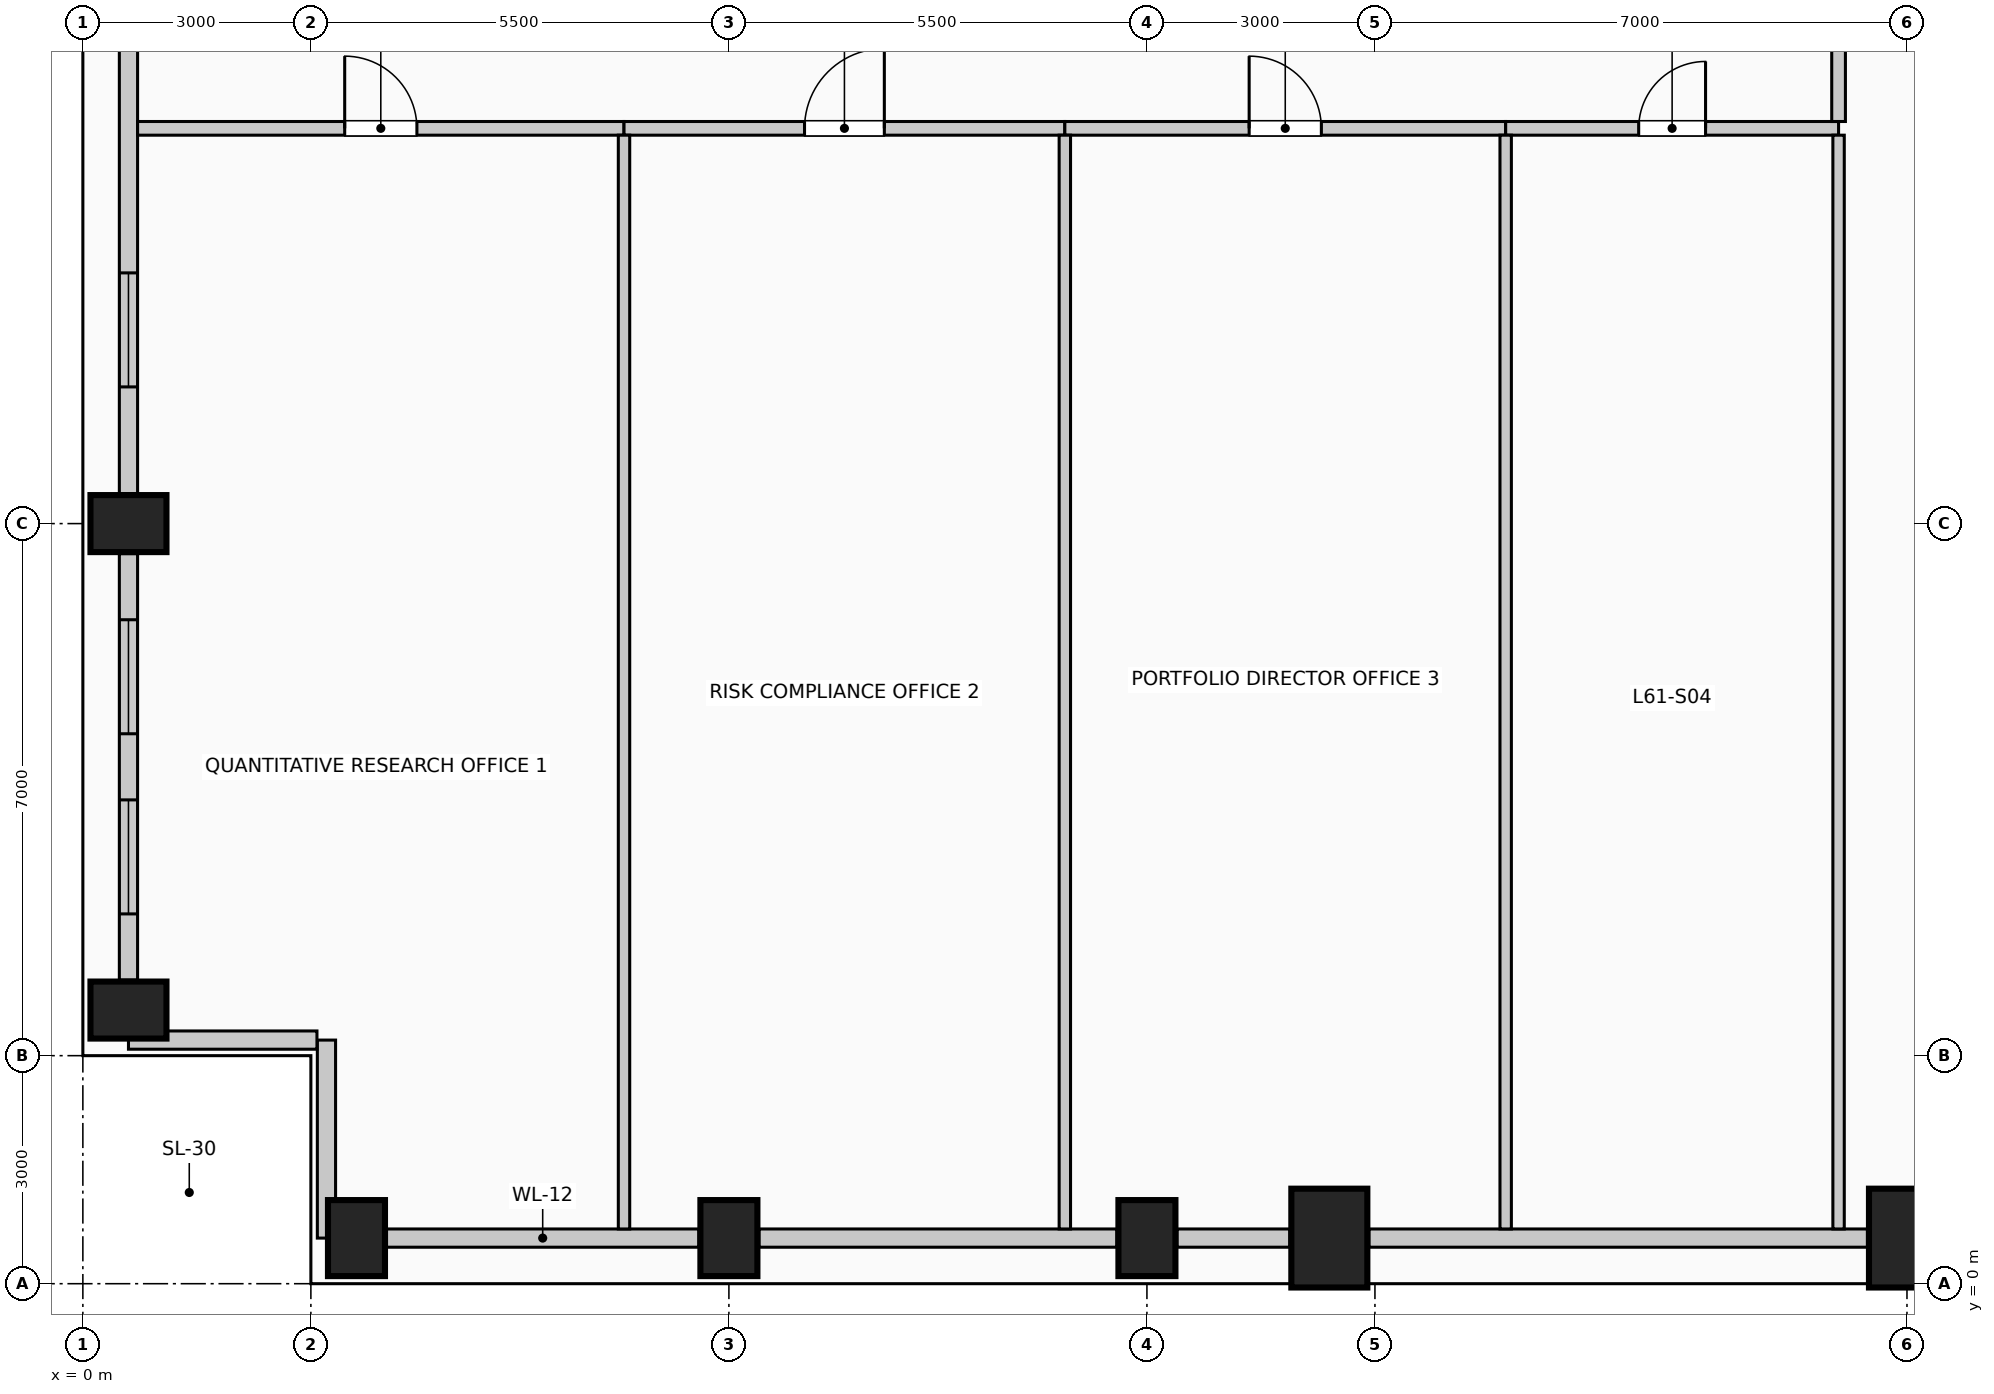
"""IFC4 building model, lengths in metres.
Left out: names, types, materials, properties, quantities, classifications, styles, units other than length and angle.
Written with IfcOpenShell. Run it as: python <this file> out.ifc"""

import sys

from ifc_helpers import new_model, si_unit, direction, frame, frame_2d, origin, origin_2d, place, context, subcontext, project, spatial, rectangle, extrude, element, fill, save


model = new_model("IFC4")
c1 = context("Model", 3, precision=1e-05, world=origin(), true_north=direction((0.0, 1.0)))
c2 = subcontext(c1, "Body", "Model", "MODEL_VIEW")
j1 = project(units=[si_unit("LENGTHUNIT", "METRE"), si_unit("PLANEANGLEUNIT", "RADIAN")], contexts=[c1])
p1 = place(None, origin())
s1 = spatial("IfcSite", under=j1, at=p1, CompositionType="ELEMENT")
p2 = place(p1, origin())
s2 = spatial("IfcBuilding", under=s1, at=p2, CompositionType="ELEMENT")
p3 = place(p2, frame((0.0, 0.0, 252.6)))
s3 = spatial("IfcBuildingStorey", under=s2, at=p3, CompositionType="ELEMENT", Elevation=252.6)
for number, where, z_axis, x_axis in (
    (1, (3.6, 0.6, 0.0), (0.0, 0.0, 1.0), (1.0, 0.0, 0.0)),
    (2, (8.5, 0.6, 0.0), (0.0, 0.0, 1.0), (1.0, 0.0, 0.0)),
    (3, (14.0, 0.6, 0.0), (0.0, 0.0, 1.0), (1.0, 0.0, 0.0)),
):
    element("IfcColumn", number, at=place(p3, frame(where, z_axis=z_axis, x_axis=x_axis)), inside=s3, PredefinedType="COLUMN", context=c2, shape_type="SweptSolid", body=[
        extrude(rectangle(XDim=0.75, YDim=1.0, at=origin_2d()), origin(), (0.0, 0.0, 1.0), 4.0),
    ])
for number, where, z_axis, x_axis in (
    (4, (16.4, 0.6, 0.0), (0.0, 0.0, 1.0), (1.0, 0.0, 0.0)),
    (5, (24.0, 0.6, 0.0), (0.0, 0.0, 1.0), (1.0, 0.0, 0.0)),
):
    element("IfcColumn", number, at=place(p3, frame(where, z_axis=z_axis, x_axis=x_axis)), inside=s3, PredefinedType="COLUMN", context=c2, shape_type="SweptSolid", body=[
        extrude(rectangle(XDim=1.0, YDim=1.3, at=origin_2d()), origin(), (0.0, 0.0, 1.0), 4.0),
    ])
for number, where, z_axis, x_axis in (
    (6, (0.6, 3.6, 0.0), (0.0, 0.0, 1.0), (0.0, 1.0, 0.0)),
    (7, (0.6, 10.0, 0.0), (0.0, 0.0, 1.0), (0.0, 1.0, 0.0)),
):
    element("IfcColumn", number, at=place(p3, frame(where, z_axis=z_axis, x_axis=x_axis)), inside=s3, PredefinedType="COLUMN", context=c2, shape_type="SweptSolid", body=[
        extrude(rectangle(XDim=0.75, YDim=1.0, at=origin_2d()), origin(), (0.0, 0.0, 1.0), 4.0),
    ])
p4 = place(p3, frame((8.105, 0.6, 0.0), z_axis=(0.0, 0.0, 1.0), x_axis=(-1.0, 0.0, 0.0)))
e8 = element("IfcWall", 8, at=p4, inside=s3, PredefinedType="SOLIDWALL", context=c2, shape_type="SweptSolid", body=[
    extrude(rectangle(XDim=4.11, YDim=0.24, at=frame_2d((2.055, 0.0))), origin(), (0.0, 0.0, 1.0), 3.0),
])
p5 = place(p3, frame((13.605, 0.6, 0.0), z_axis=(0.0, 0.0, 1.0), x_axis=(-1.0, 0.0, 0.0)))
e9 = element("IfcWall", 9, at=p5, inside=s3, PredefinedType="SOLIDWALL", context=c2, shape_type="SweptSolid", body=[
    extrude(rectangle(XDim=4.71, YDim=0.24, at=frame_2d((2.355, 0.0))), origin(), (0.0, 0.0, 1.0), 3.0),
])
p6 = place(p3, frame((15.88, 0.6, 0.0), z_axis=(0.0, 0.0, 1.0), x_axis=(-1.0, 0.0, 0.0)))
e10 = element("IfcWall", 10, at=p6, inside=s3, PredefinedType="SOLIDWALL", context=c2, shape_type="SweptSolid", body=[
    extrude(rectangle(XDim=1.485, YDim=0.24, at=frame_2d((0.742, 0.0))), origin(), (0.0, 0.0, 1.0), 3.0),
])
p7 = place(p3, frame((23.48, 0.6, 0.0), z_axis=(0.0, 0.0, 1.0), x_axis=(-1.0, 0.0, 0.0)))
e11 = element("IfcWall", 11, at=p7, inside=s3, PredefinedType="SOLIDWALL", context=c2, shape_type="SweptSolid", body=[
    extrude(rectangle(XDim=6.56, YDim=0.24, at=frame_2d((3.28, 0.0))), origin(), (0.0, 0.0, 1.0), 3.0),
])
p8 = place(p3, frame((0.6, 3.995, 0.0), z_axis=(0.0, 0.0, 1.0), x_axis=(0.0, 1.0, 0.0)))
e12 = element("IfcWall", 12, at=p8, inside=s3, PredefinedType="SOLIDWALL", context=c2, shape_type="SweptSolid", body=[
    extrude(rectangle(XDim=5.61, YDim=0.24, at=frame_2d((2.805, 0.0))), origin(), (0.0, 0.0, 1.0), 3.0),
])
p9 = place(p8, frame((0.87, 0.0, 0.42)))
e13 = element("IfcOpeningElement", 13, at=p9, cuts=e12, PredefinedType="OPENING", context=c2, shape_type="SweptSolid", body=[
    extrude(rectangle(XDim=1.5, YDim=2.2, at=frame_2d((0.75, 1.1))), frame((0.0, 0.13, 0.0), z_axis=(0.0, -1.0, 0.0), x_axis=(1.0, 0.0, 0.0)), (0.0, 0.0, 1.0), 0.26),
])
p10 = place(p8, frame((3.24, 0.0, 0.42)))
e14 = element("IfcOpeningElement", 14, at=p10, cuts=e12, PredefinedType="OPENING", context=c2, shape_type="SweptSolid", body=[
    extrude(rectangle(XDim=1.5, YDim=2.2, at=frame_2d((0.75, 1.1))), frame((0.0, 0.13, 0.0), z_axis=(0.0, -1.0, 0.0), x_axis=(1.0, 0.0, 0.0)), (0.0, 0.0, 1.0), 0.26),
])
p11 = place(p3, frame((0.6, 10.395, 0.0), z_axis=(0.0, 0.0, 1.0), x_axis=(0.0, 1.0, 0.0)))
e15 = element("IfcWall", 15, at=p11, inside=s3, PredefinedType="SOLIDWALL", context=c2, shape_type="SweptSolid", body=[
    extrude(rectangle(XDim=7.21, YDim=0.24, at=frame_2d((3.605, 0.0))), origin(), (0.0, 0.0, 1.0), 3.0),
])
p12 = place(p11, frame((1.403, 0.0, 0.42)))
e16 = element("IfcOpeningElement", 16, at=p12, cuts=e15, PredefinedType="OPENING", context=c2, shape_type="SweptSolid", body=[
    extrude(rectangle(XDim=1.5, YDim=2.2, at=frame_2d((0.75, 1.1))), frame((0.0, 0.13, 0.0), z_axis=(0.0, -1.0, 0.0), x_axis=(1.0, 0.0, 0.0)), (0.0, 0.0, 1.0), 0.26),
])
p13 = place(p3, frame((3.205, 0.6, 0.0), z_axis=(0.0, 0.0, 1.0), x_axis=(0.0, 1.0, 0.0)))
e17 = element("IfcWall", 17, at=p13, inside=s3, PredefinedType="SOLIDWALL", context=c2, shape_type="SweptSolid", body=[
    extrude(rectangle(XDim=2.605, YDim=0.24, at=frame_2d((1.302, 0.0))), origin(), (0.0, 0.0, 1.0), 3.75),
])
p14 = place(p3, frame((3.08, 3.205, 0.0), z_axis=(0.0, 0.0, 1.0), x_axis=(-1.0, 0.0, 0.0)))
e18 = element("IfcWall", 18, at=p14, inside=s3, PredefinedType="SOLIDWALL", context=c2, shape_type="SweptSolid", body=[
    extrude(rectangle(XDim=2.48, YDim=0.24, at=frame_2d((1.24, 0.0))), origin(), (0.0, 0.0, 1.0), 3.75),
])
p15 = place(p3, frame((0.72, 15.2, 0.0), z_axis=(0.0, 0.0, 1.0), x_axis=(1.0, 0.0, 0.0)))
e19 = element("IfcWall", 19, at=p15, inside=s3, PredefinedType="PARTITIONING", context=c2, shape_type="SweptSolid", body=[
    extrude(rectangle(XDim=6.4, YDim=0.18, at=frame_2d((3.2, 0.0))), origin(), (0.0, 0.0, 1.0), 3.75),
])
p16 = place(p15, frame((2.725, 0.0, 0.0)))
e20 = element("IfcOpeningElement", 20, at=p16, cuts=e19, PredefinedType="OPENING", context=c2, shape_type="SweptSolid", body=[
    extrude(rectangle(XDim=0.95, YDim=2.15, at=frame_2d((0.475, 1.075))), frame((0.0, 0.1, 0.0), z_axis=(0.0, -1.0, 0.0), x_axis=(1.0, 0.0, 0.0)), (0.0, 0.0, 1.0), 0.2),
])
p17 = place(p3, frame((7.12, 15.2, 0.0), z_axis=(0.0, 0.0, 1.0), x_axis=(1.0, 0.0, 0.0)))
e21 = element("IfcWall", 21, at=p17, inside=s3, PredefinedType="PARTITIONING", context=c2, shape_type="SweptSolid", body=[
    extrude(rectangle(XDim=5.8, YDim=0.18, at=frame_2d((2.9, 0.0))), origin(), (0.0, 0.0, 1.0), 3.75),
])
p18 = place(p17, frame((2.375, 0.0, 0.0)))
e22 = element("IfcOpeningElement", 22, at=p18, cuts=e21, PredefinedType="OPENING", context=c2, shape_type="SweptSolid", body=[
    extrude(rectangle(XDim=1.05, YDim=2.15, at=frame_2d((0.525, 1.075))), frame((0.0, 0.1, 0.0), z_axis=(0.0, -1.0, 0.0), x_axis=(1.0, 0.0, 0.0)), (0.0, 0.0, 1.0), 0.2),
])
p19 = place(p3, frame((12.92, 15.2, 0.0), z_axis=(0.0, 0.0, 1.0), x_axis=(1.0, 0.0, 0.0)))
e23 = element("IfcWall", 23, at=p19, inside=s3, PredefinedType="PARTITIONING", context=c2, shape_type="SweptSolid", body=[
    extrude(rectangle(XDim=5.8, YDim=0.18, at=frame_2d((2.9, 0.0))), origin(), (0.0, 0.0, 1.0), 3.75),
])
p20 = place(p19, frame((2.425, 0.0, 0.0)))
e24 = element("IfcOpeningElement", 24, at=p20, cuts=e23, PredefinedType="OPENING", context=c2, shape_type="SweptSolid", body=[
    extrude(rectangle(XDim=0.95, YDim=2.15, at=frame_2d((0.475, 1.075))), frame((0.0, 0.1, 0.0), z_axis=(0.0, -1.0, 0.0), x_axis=(1.0, 0.0, 0.0)), (0.0, 0.0, 1.0), 0.2),
])
p21 = place(p3, frame((18.72, 15.2, 0.0), z_axis=(0.0, 0.0, 1.0), x_axis=(1.0, 0.0, 0.0)))
e25 = element("IfcWall", 25, at=p21, inside=s3, PredefinedType="PARTITIONING", context=c2, shape_type="SweptSolid", body=[
    extrude(rectangle(XDim=4.38, YDim=0.18, at=frame_2d((2.19, 0.0))), origin(), (0.0, 0.0, 1.0), 3.75),
])
p22 = place(p21, frame((1.75, 0.0, 0.0)))
e26 = element("IfcOpeningElement", 26, at=p22, cuts=e25, PredefinedType="OPENING", context=c2, shape_type="SweptSolid", body=[
    extrude(rectangle(XDim=0.88, YDim=2.1, at=frame_2d((0.44, 1.05))), frame((0.0, 0.1, 0.0), z_axis=(0.0, -1.0, 0.0), x_axis=(1.0, 0.0, 0.0)), (0.0, 0.0, 1.0), 0.2),
])
for number, where, z_axis, x_axis in (
    (27, (7.12, 0.72, 0.0), (0.0, 0.0, 1.0), (0.0, 1.0, 0.0)),
    (28, (12.92, 0.72, 0.0), (0.0, 0.0, 1.0), (0.0, 1.0, 0.0)),
    (29, (18.72, 0.72, 0.0), (0.0, 0.0, 1.0), (0.0, 1.0, 0.0)),
    (30, (23.1, 0.72, 0.0), (0.0, 0.0, 1.0), (0.0, 1.0, 0.0)),
):
    element("IfcWall", number, at=place(p3, frame(where, z_axis=z_axis, x_axis=x_axis)), inside=s3, PredefinedType="PARTITIONING", context=c2, shape_type="SweptSolid", body=[
        extrude(rectangle(XDim=14.39, YDim=0.15, at=frame_2d((7.195, 0.0))), origin(), (0.0, 0.0, 1.0), 3.75),
    ])
p23 = place(p3, frame((23.1, 15.29, 0.0), z_axis=(0.0, 0.0, 1.0), x_axis=(0.0, 1.0, 0.0)))
e31 = element("IfcWall", 31, at=p23, inside=s3, PredefinedType="PARTITIONING", context=c2, shape_type="SweptSolid", body=[
    extrude(rectangle(XDim=2.01, YDim=0.18, at=frame_2d((1.005, 0.0))), origin(), (0.0, 0.0, 1.0), 3.75),
])
p24 = place(p9, origin())
e32 = element("IfcWindow", 32, at=p24, inside=s3, PartitioningType="SINGLE_PANEL", PredefinedType="WINDOW", context=c2, shape_type="SweptSolid", body=[
    extrude(rectangle(XDim=1.5, YDim=2.2, at=frame_2d((0.75, 1.1))), frame((0.0, 0.03, 0.0), z_axis=(0.0, -1.0, 0.0), x_axis=(1.0, 0.0, 0.0)), (0.0, 0.0, 1.0), 0.06),
])
fill(e13, e32)
p25 = place(p10, origin())
e33 = element("IfcWindow", 33, at=p25, inside=s3, PartitioningType="SINGLE_PANEL", PredefinedType="WINDOW", context=c2, shape_type="SweptSolid", body=[
    extrude(rectangle(XDim=1.5, YDim=2.2, at=frame_2d((0.75, 1.1))), frame((0.0, 0.03, 0.0), z_axis=(0.0, -1.0, 0.0), x_axis=(1.0, 0.0, 0.0)), (0.0, 0.0, 1.0), 0.06),
])
fill(e14, e33)
p26 = place(p12, origin())
e34 = element("IfcWindow", 34, at=p26, inside=s3, PartitioningType="SINGLE_PANEL", PredefinedType="WINDOW", context=c2, shape_type="SweptSolid", body=[
    extrude(rectangle(XDim=1.5, YDim=2.2, at=frame_2d((0.75, 1.1))), frame((0.0, 0.03, 0.0), z_axis=(0.0, -1.0, 0.0), x_axis=(1.0, 0.0, 0.0)), (0.0, 0.0, 1.0), 0.06),
])
fill(e16, e34)
p27 = place(p16, origin())
e35 = element("IfcDoor", 35, at=p27, inside=s3, OperationType="SINGLE_SWING_LEFT", PredefinedType="DOOR", context=c2, shape_type="SweptSolid", body=[
    extrude(rectangle(XDim=0.95, YDim=2.15, at=frame_2d((0.475, 1.075))), frame((0.0, 0.025, 0.0), z_axis=(0.0, -1.0, 0.0), x_axis=(1.0, 0.0, 0.0)), (0.0, 0.0, 1.0), 0.05),
])
fill(e20, e35)
p28 = place(p18, origin())
e36 = element("IfcDoor", 36, at=p28, inside=s3, OperationType="SINGLE_SWING_RIGHT", PredefinedType="DOOR", context=c2, shape_type="SweptSolid", body=[
    extrude(rectangle(XDim=1.05, YDim=2.15, at=frame_2d((0.525, 1.075))), frame((0.0, 0.025, 0.0), z_axis=(0.0, -1.0, 0.0), x_axis=(1.0, 0.0, 0.0)), (0.0, 0.0, 1.0), 0.05),
])
fill(e22, e36)
p29 = place(p20, origin())
e37 = element("IfcDoor", 37, at=p29, inside=s3, OperationType="SINGLE_SWING_LEFT", PredefinedType="DOOR", context=c2, shape_type="SweptSolid", body=[
    extrude(rectangle(XDim=0.95, YDim=2.15, at=frame_2d((0.475, 1.075))), frame((0.0, 0.025, 0.0), z_axis=(0.0, -1.0, 0.0), x_axis=(1.0, 0.0, 0.0)), (0.0, 0.0, 1.0), 0.05),
])
fill(e24, e37)
p30 = place(p22, origin())
e38 = element("IfcDoor", 38, at=p30, inside=s3, OperationType="SINGLE_SWING_RIGHT", PredefinedType="DOOR", context=c2, shape_type="SweptSolid", body=[
    extrude(rectangle(XDim=0.88, YDim=2.1, at=frame_2d((0.44, 1.05))), frame((0.0, 0.025, 0.0), z_axis=(0.0, -1.0, 0.0), x_axis=(1.0, 0.0, 0.0)), (0.0, 0.0, 1.0), 0.05),
])
fill(e26, e38)
save(model, sys.argv[1])
